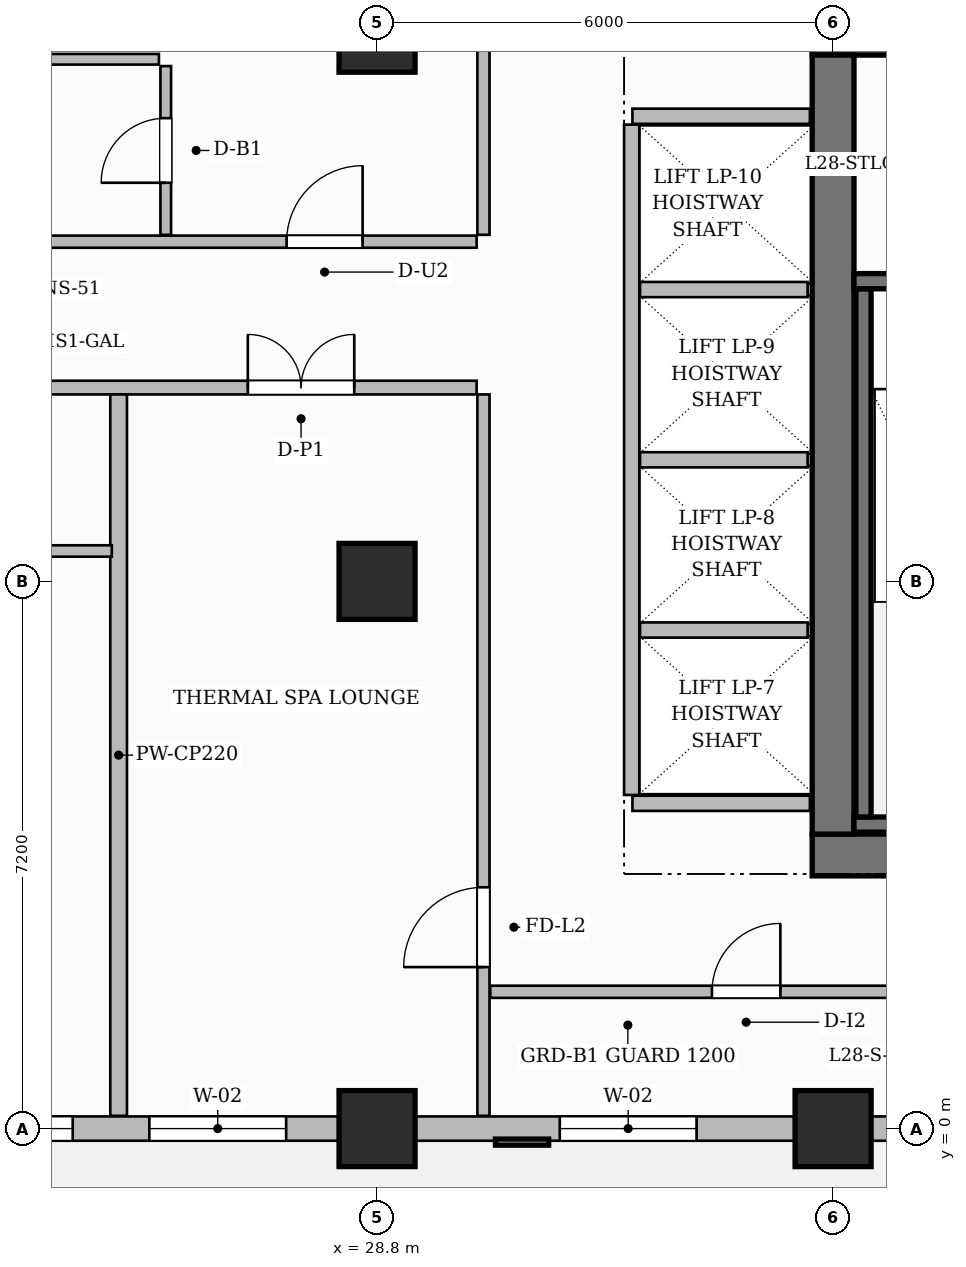
"""IFC4 building model, lengths in metres.
Left out: names, types, materials, properties, quantities, classifications, styles, units other than length and angle.
Written with IfcOpenShell. Run it as: python <this file> out.ifc"""

import sys

from ifc_helpers import new_model, si_unit, direction, frame, frame_2d, origin, origin_2d, place, context, subcontext, project, spatial, rectangle, extrude, source, transform, mapped, element, fill, save


model = new_model("IFC4")
c1 = context("Model", 3, precision=1e-05, world=origin(), true_north=direction((0.0, 1.0)))
c2 = subcontext(c1, "Body", "Model", "MODEL_VIEW")
j1 = project(units=[si_unit("LENGTHUNIT", "METRE"), si_unit("PLANEANGLEUNIT", "RADIAN")], contexts=[c1])
p1 = place(None, origin())
s1 = spatial("IfcSite", under=j1, at=p1, CompositionType="ELEMENT")
p2 = place(p1, origin())
s2 = spatial("IfcBuilding", under=s1, at=p2, CompositionType="ELEMENT")
p3 = place(p2, frame((0.0, 0.0, 115.5)))
s3 = spatial("IfcBuildingStorey", under=s2, at=p3, CompositionType="ELEMENT", Elevation=115.5)
p4 = place(p3, frame((34.525, 3.6, 0.0), z_axis=(0.0, 0.0, 1.0), x_axis=(1.0, 0.0, 0.0)))
e1 = element("IfcWall", 1, at=p4, inside=s3, PredefinedType="SHEAR", context=c2, shape_type="SweptSolid", body=[
    extrude(rectangle(XDim=15.55, YDim=0.55, at=frame_2d((7.775, 0.0))), origin(), (0.0, 0.0, 1.0), 3.7),
])
p5 = place(p4, frame((4.745, 0.0, 0.0)))
e2 = element("IfcOpeningElement", 2, at=p5, cuts=e1, PredefinedType="OPENING", context=c2, shape_type="SweptSolid", body=[
    extrude(rectangle(XDim=0.9, YDim=2.1, at=frame_2d((0.45, 1.05))), frame((0.0, 0.285, 0.0), z_axis=(0.0, -1.0, 0.0), x_axis=(1.0, 0.0, 0.0)), (0.0, 0.0, 1.0), 0.57),
])
p6 = place(p4, frame((7.125, 0.0, 0.0)))
e3 = element("IfcOpeningElement", 3, at=p6, cuts=e1, PredefinedType="OPENING", context=c2, shape_type="SweptSolid", body=[
    extrude(rectangle(XDim=0.9, YDim=2.1, at=frame_2d((0.45, 1.05))), frame((0.0, 0.285, 0.0), z_axis=(0.0, -1.0, 0.0), x_axis=(1.0, 0.0, 0.0)), (0.0, 0.0, 1.0), 0.57),
])
p7 = place(p3, frame((34.525, 14.4, 0.0), z_axis=(0.0, 0.0, 1.0), x_axis=(1.0, 0.0, 0.0)))
e4 = element("IfcWall", 4, at=p7, inside=s3, PredefinedType="SHEAR", context=c2, shape_type="SweptSolid", body=[
    extrude(rectangle(XDim=15.55, YDim=0.55, at=frame_2d((7.775, 0.0))), origin(), (0.0, 0.0, 1.0), 3.7),
])
p8 = place(p7, frame((5.405, 0.0, 0.0)))
e5 = element("IfcOpeningElement", 5, at=p8, cuts=e4, PredefinedType="OPENING", context=c2, shape_type="SweptSolid", body=[
    extrude(rectangle(XDim=1.5, YDim=2.2, at=frame_2d((0.75, 1.1))), frame((0.0, 0.285, 0.0), z_axis=(0.0, -1.0, 0.0), x_axis=(1.0, 0.0, 0.0)), (0.0, 0.0, 1.0), 0.57),
])
p9 = place(p7, frame((1.62, 0.0, 0.0)))
e6 = element("IfcOpeningElement", 6, at=p9, cuts=e4, PredefinedType="OPENING", context=c2, shape_type="SweptSolid", body=[
    extrude(rectangle(XDim=1.05, YDim=2.15, at=frame_2d((0.525, 1.075))), frame((0.0, 0.285, 0.0), z_axis=(0.0, -1.0, 0.0), x_axis=(1.0, 0.0, 0.0)), (0.0, 0.0, 1.0), 0.57),
])
p10 = place(p7, frame((11.25, 0.0, 0.0)))
e7 = element("IfcOpeningElement", 7, at=p10, cuts=e4, PredefinedType="OPENING", context=c2, shape_type="SweptSolid", body=[
    extrude(rectangle(XDim=1.05, YDim=2.15, at=frame_2d((0.525, 1.075))), frame((0.0, 0.285, 0.0), z_axis=(0.0, -1.0, 0.0), x_axis=(1.0, 0.0, 0.0)), (0.0, 0.0, 1.0), 0.57),
])
p11 = place(p3, frame((34.8, 3.875, 0.0), z_axis=(0.0, 0.0, 1.0), x_axis=(0.0, 1.0, 0.0)))
e8 = element("IfcWall", 8, at=p11, inside=s3, PredefinedType="SHEAR", context=c2, shape_type="SweptSolid", body=[
    extrude(rectangle(XDim=10.25, YDim=0.55, at=frame_2d((5.125, 0.0))), origin(), (0.0, 0.0, 1.0), 3.7),
])
m1 = source(origin(), c2, "Body", "SweptSolid", [
    extrude(rectangle(XDim=1.0, YDim=1.0, at=origin_2d()), origin(), (0.0, 0.0, 1.0), 3.7),
])
for number, where, z_axis, x_axis in (
    (9, (28.8, 0.0, 0.0), (0.0, 0.0, 1.0), (1.0, 0.0, 0.0)),
    (10, (28.8, 7.2, 0.0), (0.0, 0.0, 1.0), (1.0, 0.0, 0.0)),
    (11, (28.8, 14.4, 0.0), (0.0, 0.0, 1.0), (1.0, 0.0, 0.0)),
    (12, (34.8, 0.0, 0.0), (0.0, 0.0, 1.0), (1.0, 0.0, 0.0)),
):
    element("IfcColumn", number, at=place(p3, frame(where, z_axis=z_axis, x_axis=x_axis)), inside=s3, PredefinedType="COLUMN", context=c2, shape_type="MappedRepresentation", body=[
        mapped(m1, transform((0.0, 0.0, 0.0), scale=1.0)),
    ])
p12 = place(p3, frame((35.075, 4.0, 0.0), z_axis=(0.0, 0.0, 1.0), x_axis=(1.0, 0.0, 0.0)))
e13 = element("IfcWall", 13, at=p12, inside=s3, PredefinedType="SHEAR", context=c2, shape_type="SweptSolid", body=[
    extrude(rectangle(XDim=3.165, YDim=0.2, at=frame_2d((1.583, 0.0))), origin(), (0.0, 0.0, 1.0), 3.7),
])
p13 = place(p3, frame((35.2, 4.1, 0.0), z_axis=(0.0, 0.0, 1.0), x_axis=(0.0, 1.0, 0.0)))
e14 = element("IfcWall", 14, at=p13, inside=s3, PredefinedType="SHEAR", context=c2, shape_type="SweptSolid", body=[
    extrude(rectangle(XDim=6.95, YDim=0.2, at=frame_2d((3.475, 0.0))), origin(), (0.0, 0.0, 1.0), 3.7),
])
p14 = place(p3, frame((35.075, 11.15, 0.0), z_axis=(0.0, 0.0, 1.0), x_axis=(1.0, 0.0, 0.0)))
e15 = element("IfcWall", 15, at=p14, inside=s3, PredefinedType="SHEAR", context=c2, shape_type="SweptSolid", body=[
    extrude(rectangle(XDim=3.165, YDim=0.2, at=frame_2d((1.583, 0.0))), origin(), (0.0, 0.0, 1.0), 3.7),
])
p15 = place(p14, frame((1.07, 0.0, 0.0)))
e16 = element("IfcOpeningElement", 16, at=p15, cuts=e15, PredefinedType="OPENING", context=c2, shape_type="SweptSolid", body=[
    extrude(rectangle(XDim=1.05, YDim=2.2, at=frame_2d((0.525, 1.1))), frame((0.0, 0.11, 0.0), z_axis=(0.0, -1.0, 0.0), x_axis=(1.0, 0.0, 0.0)), (0.0, 0.0, 1.0), 0.22),
])
for number, where, z_axis, x_axis in (
    (17, (32.16, 4.28, 0.0), (0.0, 0.0, 1.0), (1.0, 0.0, 0.0)),
    (18, (32.16, 13.32, 0.0), (0.0, 0.0, 1.0), (1.0, 0.0, 0.0)),
):
    element("IfcWall", number, at=place(p3, frame(where, z_axis=z_axis, x_axis=x_axis)), inside=s3, PredefinedType="PARTITIONING", context=c2, shape_type="SweptSolid", body=[
        extrude(rectangle(XDim=2.335, YDim=0.2, at=frame_2d((1.167, 0.0))), origin(), (0.0, 0.0, 1.0), 3.45),
    ])
p16 = place(p3, frame((32.15, 4.39, 0.0), z_axis=(0.0, 0.0, 1.0), x_axis=(0.0, 1.0, 0.0)))
e19 = element("IfcWall", 19, at=p16, inside=s3, PredefinedType="PARTITIONING", context=c2, shape_type="SweptSolid", body=[
    extrude(rectangle(XDim=8.82, YDim=0.2, at=frame_2d((4.41, 0.0))), origin(), (0.0, 0.0, 1.0), 3.45),
])
for number, where, z_axis, x_axis in (
    (20, (32.26, 6.56, 0.0), (0.0, 0.0, 1.0), (1.0, 0.0, 0.0)),
    (21, (32.26, 8.8, 0.0), (0.0, 0.0, 1.0), (1.0, 0.0, 0.0)),
    (22, (32.26, 11.04, 0.0), (0.0, 0.0, 1.0), (1.0, 0.0, 0.0)),
):
    element("IfcWall", number, at=place(p3, frame(where, z_axis=z_axis, x_axis=x_axis)), inside=s3, PredefinedType="PARTITIONING", context=c2, shape_type="SweptSolid", body=[
        extrude(rectangle(XDim=2.205, YDim=0.2, at=frame_2d((1.103, 0.0))), origin(), (0.0, 0.0, 1.0), 3.45),
    ])
p17 = place(p3, frame((14.568, 9.75, 0.0), z_axis=(0.0, 0.0, 1.0), x_axis=(1.0, 0.0, 0.0)))
e23 = element("IfcWall", 23, at=p17, inside=s3, PredefinedType="PARTITIONING", context=c2, shape_type="SweptSolid", body=[
    extrude(rectangle(XDim=15.542, YDim=0.18, at=frame_2d((7.771, 0.0))), origin(), (0.0, 0.0, 1.0), 3.45),
])
p18 = place(p17, frame((3.062, 0.0, 0.0)))
e24 = element("IfcOpeningElement", 24, at=p18, cuts=e23, PredefinedType="OPENING", context=c2, shape_type="SweptSolid", body=[
    extrude(rectangle(XDim=1.05, YDim=2.25, at=frame_2d((0.525, 1.125))), frame((0.0, 0.1, 0.0), z_axis=(0.0, -1.0, 0.0), x_axis=(1.0, 0.0, 0.0)), (0.0, 0.0, 1.0), 0.2),
])
p19 = place(p17, frame((12.532, 0.0, 0.0)))
e25 = element("IfcOpeningElement", 25, at=p19, cuts=e23, PredefinedType="OPENING", context=c2, shape_type="SweptSolid", body=[
    extrude(rectangle(XDim=1.4, YDim=2.35, at=frame_2d((0.7, 1.175))), frame((0.0, 0.1, 0.0), z_axis=(0.0, -1.0, 0.0), x_axis=(1.0, 0.0, 0.0)), (0.0, 0.0, 1.0), 0.2),
])
p20 = place(p3, frame((14.568, 11.67, 0.0), z_axis=(0.0, 0.0, 1.0), x_axis=(1.0, 0.0, 0.0)))
e26 = element("IfcWall", 26, at=p20, inside=s3, PredefinedType="PARTITIONING", context=c2, shape_type="SweptSolid", body=[
    extrude(rectangle(XDim=15.542, YDim=0.16, at=frame_2d((7.771, 0.0))), origin(), (0.0, 0.0, 1.0), 3.45),
])
p21 = place(p20, frame((5.217, 0.0, 0.0)))
e27 = element("IfcOpeningElement", 27, at=p21, cuts=e26, PredefinedType="OPENING", context=c2, shape_type="SweptSolid", body=[
    extrude(rectangle(XDim=1.4, YDim=2.35, at=frame_2d((0.7, 1.175))), frame((0.0, 0.09, 0.0), z_axis=(0.0, -1.0, 0.0), x_axis=(1.0, 0.0, 0.0)), (0.0, 0.0, 1.0), 0.18),
])
p22 = place(p20, frame((13.042, 0.0, 0.0)))
e28 = element("IfcOpeningElement", 28, at=p22, cuts=e26, PredefinedType="OPENING", context=c2, shape_type="SweptSolid", body=[
    extrude(rectangle(XDim=1.0, YDim=2.2, at=frame_2d((0.5, 1.1))), frame((0.0, 0.09, 0.0), z_axis=(0.0, -1.0, 0.0), x_axis=(1.0, 0.0, 0.0)), (0.0, 0.0, 1.0), 0.18),
])
p23 = place(p3, frame((30.2, 11.76, 0.0), z_axis=(0.0, 0.0, 1.0), x_axis=(0.0, 1.0, 0.0)))
e29 = element("IfcWall", 29, at=p23, inside=s3, PredefinedType="PARTITIONING", context=c2, shape_type="SweptSolid", body=[
    extrude(rectangle(XDim=5.7, YDim=0.16, at=frame_2d((2.85, 0.0))), origin(), (0.0, 0.0, 1.0), 3.45),
])
p24 = place(p3, frame((30.2, 0.168, 0.0), z_axis=(0.0, 0.0, 1.0), x_axis=(0.0, 1.0, 0.0)))
e30 = element("IfcWall", 30, at=p24, inside=s3, PredefinedType="PARTITIONING", context=c2, shape_type="SweptSolid", body=[
    extrude(rectangle(XDim=9.492, YDim=0.16, at=frame_2d((4.746, 0.0))), origin(), (0.0, 0.0, 1.0), 3.45),
])
p25 = place(p24, frame((1.957, 0.0, 0.0)))
e31 = element("IfcOpeningElement", 31, at=p25, cuts=e30, PredefinedType="OPENING", context=c2, shape_type="SweptSolid", body=[
    extrude(rectangle(XDim=1.05, YDim=2.15, at=frame_2d((0.525, 1.075))), frame((0.0, 0.09, 0.0), z_axis=(0.0, -1.0, 0.0), x_axis=(1.0, 0.0, 0.0)), (0.0, 0.0, 1.0), 0.18),
])
p26 = place(p3, frame((30.29, 1.8, 0.0), z_axis=(0.0, 0.0, 1.0), x_axis=(1.0, 0.0, 0.0)))
e32 = element("IfcWall", 32, at=p26, inside=s3, PredefinedType="PARTITIONING", context=c2, shape_type="SweptSolid", body=[
    extrude(rectangle(XDim=19.37, YDim=0.16, at=frame_2d((9.685, 0.0))), origin(), (0.0, 0.0, 1.0), 3.45),
])
p27 = place(p26, frame((2.916, 0.0, 0.0)))
e33 = element("IfcOpeningElement", 33, at=p27, cuts=e32, PredefinedType="OPENING", context=c2, shape_type="SweptSolid", body=[
    extrude(rectangle(XDim=0.9, YDim=2.15, at=frame_2d((0.45, 1.075))), frame((0.0, 0.09, 0.0), z_axis=(0.0, -1.0, 0.0), x_axis=(1.0, 0.0, 0.0)), (0.0, 0.0, 1.0), 0.18),
])
p28 = place(p26, frame((9.66, 0.0, 0.0)))
e34 = element("IfcOpeningElement", 34, at=p28, cuts=e32, PredefinedType="OPENING", context=c2, shape_type="SweptSolid", body=[
    extrude(rectangle(XDim=0.9, YDim=2.15, at=frame_2d((0.45, 1.075))), frame((0.0, 0.09, 0.0), z_axis=(0.0, -1.0, 0.0), x_axis=(1.0, 0.0, 0.0)), (0.0, 0.0, 1.0), 0.18),
])
p29 = place(p26, frame((15.86, 0.0, 0.0)))
e35 = element("IfcOpeningElement", 35, at=p29, cuts=e32, PredefinedType="OPENING", context=c2, shape_type="SweptSolid", body=[
    extrude(rectangle(XDim=0.9, YDim=2.15, at=frame_2d((0.45, 1.075))), frame((0.0, 0.09, 0.0), z_axis=(0.0, -1.0, 0.0), x_axis=(1.0, 0.0, 0.0)), (0.0, 0.0, 1.0), 0.18),
])
p30 = place(p3, frame((25.4, 0.168, 0.0), z_axis=(0.0, 0.0, 1.0), x_axis=(0.0, 1.0, 0.0)))
e36 = element("IfcWall", 36, at=p30, inside=s3, PredefinedType="PARTITIONING", context=c2, shape_type="SweptSolid", body=[
    extrude(rectangle(XDim=9.492, YDim=0.22, at=frame_2d((4.746, 0.0))), origin(), (0.0, 0.0, 1.0), 3.105),
])
p31 = place(p3, frame((19.57, 7.6, 0.0), z_axis=(0.0, 0.0, 1.0), x_axis=(1.0, 0.0, 0.0)))
e37 = element("IfcWall", 37, at=p31, inside=s3, PredefinedType="PARTITIONING", context=c2, shape_type="SweptSolid", body=[
    extrude(rectangle(XDim=5.74, YDim=0.15, at=frame_2d((2.87, 0.0))), origin(), (0.0, 0.0, 1.0), 3.45),
])
p32 = place(p31, frame((2.762, 0.0, 0.0)))
e38 = element("IfcOpeningElement", 38, at=p32, cuts=e37, PredefinedType="OPENING", context=c2, shape_type="SweptSolid", body=[
    extrude(rectangle(XDim=0.9, YDim=2.15, at=frame_2d((0.45, 1.075))), frame((0.0, 0.085, 0.0), z_axis=(0.0, -1.0, 0.0), x_axis=(1.0, 0.0, 0.0)), (0.0, 0.0, 1.0), 0.17),
])
p33 = place(p3, frame((26.02, 11.76, 0.0), z_axis=(0.0, 0.0, 1.0), x_axis=(0.0, 1.0, 0.0)))
e39 = element("IfcWall", 39, at=p33, inside=s3, PredefinedType="PARTITIONING", context=c2, shape_type="SweptSolid", body=[
    extrude(rectangle(XDim=2.22, YDim=0.14, at=frame_2d((1.11, 0.0))), origin(), (0.0, 0.0, 1.0), 3.45),
])
p34 = place(p33, frame((0.685, 0.0, 0.0)))
e40 = element("IfcOpeningElement", 40, at=p34, cuts=e39, PredefinedType="OPENING", context=c2, shape_type="SweptSolid", body=[
    extrude(rectangle(XDim=0.85, YDim=2.1, at=frame_2d((0.425, 1.05))), frame((0.0, 0.08, 0.0), z_axis=(0.0, -1.0, 0.0), x_axis=(1.0, 0.0, 0.0)), (0.0, 0.0, 1.0), 0.16),
])
p35 = place(p3, frame((23.81, 14.07, 0.0), z_axis=(0.0, 0.0, 1.0), x_axis=(1.0, 0.0, 0.0)))
e41 = element("IfcWall", 41, at=p35, inside=s3, PredefinedType="PARTITIONING", context=c2, shape_type="SweptSolid", body=[
    extrude(rectangle(XDim=2.12, YDim=0.14, at=frame_2d((1.06, 0.0))), origin(), (0.0, 0.0, 1.0), 3.45),
])
p36 = place(p3, frame((14.4, 0.0, 0.0), z_axis=(0.0, 0.0, 1.0), x_axis=(1.0, 0.0, 0.0)))
e42 = element("IfcWall", 42, at=p36, inside=s3, PredefinedType="SOLIDWALL", context=c2, shape_type="SweptSolid", body=[
    extrude(rectangle(XDim=35.4, YDim=0.32, at=frame_2d((17.7, 0.0))), origin(), (0.0, 0.0, 1.0), 2.935),
])
p37 = place(p36, frame((0.85, 0.0, 0.0)))
e43 = element("IfcOpeningElement", 43, at=p37, cuts=e42, PredefinedType="OPENING", context=c2, shape_type="SweptSolid", body=[
    extrude(rectangle(XDim=1.2, YDim=2.2, at=frame_2d((0.6, 1.1))), frame((0.0, 0.17, 0.0), z_axis=(0.0, -1.0, 0.0), x_axis=(1.0, 0.0, 0.0)), (0.0, 0.0, 1.0), 0.34),
])
p38 = place(p36, frame((2.811, 0.0, 0.8)))
e44 = element("IfcOpeningElement", 44, at=p38, cuts=e42, PredefinedType="OPENING", context=c2, shape_type="SweptSolid", body=[
    extrude(rectangle(XDim=1.8, YDim=1.85, at=frame_2d((0.9, 0.925))), frame((0.0, 0.17, 0.0), z_axis=(0.0, -1.0, 0.0), x_axis=(1.0, 0.0, 0.0)), (0.0, 0.0, 1.0), 0.34),
])
p39 = place(p36, frame((5.269, 0.0, 0.8)))
e45 = element("IfcOpeningElement", 45, at=p39, cuts=e42, PredefinedType="OPENING", context=c2, shape_type="SweptSolid", body=[
    extrude(rectangle(XDim=0.95, YDim=1.75, at=frame_2d((0.475, 0.875))), frame((0.0, 0.17, 0.0), z_axis=(0.0, -1.0, 0.0), x_axis=(1.0, 0.0, 0.0)), (0.0, 0.0, 1.0), 0.34),
])
p40 = place(p36, frame((8.596, 0.0, 0.8)))
e46 = element("IfcOpeningElement", 46, at=p40, cuts=e42, PredefinedType="OPENING", context=c2, shape_type="SweptSolid", body=[
    extrude(rectangle(XDim=1.8, YDim=1.85, at=frame_2d((0.9, 0.925))), frame((0.0, 0.17, 0.0), z_axis=(0.0, -1.0, 0.0), x_axis=(1.0, 0.0, 0.0)), (0.0, 0.0, 1.0), 0.34),
])
p41 = place(p36, frame((11.404, 0.0, 0.8)))
e47 = element("IfcOpeningElement", 47, at=p41, cuts=e42, PredefinedType="OPENING", context=c2, shape_type="SweptSolid", body=[
    extrude(rectangle(XDim=1.8, YDim=1.85, at=frame_2d((0.9, 0.925))), frame((0.0, 0.17, 0.0), z_axis=(0.0, -1.0, 0.0), x_axis=(1.0, 0.0, 0.0)), (0.0, 0.0, 1.0), 0.34),
])
p42 = place(p36, frame((16.804, 0.0, 0.8)))
e48 = element("IfcOpeningElement", 48, at=p42, cuts=e42, PredefinedType="OPENING", context=c2, shape_type="SweptSolid", body=[
    extrude(rectangle(XDim=1.8, YDim=1.85, at=frame_2d((0.9, 0.925))), frame((0.0, 0.17, 0.0), z_axis=(0.0, -1.0, 0.0), x_axis=(1.0, 0.0, 0.0)), (0.0, 0.0, 1.0), 0.34),
])
p43 = place(p36, frame((21.521, 0.0, 0.8)))
e49 = element("IfcOpeningElement", 49, at=p43, cuts=e42, PredefinedType="OPENING", context=c2, shape_type="SweptSolid", body=[
    extrude(rectangle(XDim=0.95, YDim=1.75, at=frame_2d((0.475, 0.875))), frame((0.0, 0.17, 0.0), z_axis=(0.0, -1.0, 0.0), x_axis=(1.0, 0.0, 0.0)), (0.0, 0.0, 1.0), 0.34),
])
p44 = place(p36, frame((23.904, 0.0, 0.8)))
e50 = element("IfcOpeningElement", 50, at=p44, cuts=e42, PredefinedType="OPENING", context=c2, shape_type="SweptSolid", body=[
    extrude(rectangle(XDim=1.8, YDim=1.85, at=frame_2d((0.9, 0.925))), frame((0.0, 0.17, 0.0), z_axis=(0.0, -1.0, 0.0), x_axis=(1.0, 0.0, 0.0)), (0.0, 0.0, 1.0), 0.34),
])
p45 = place(p36, frame((29.681, 0.0, 0.8)))
e51 = element("IfcOpeningElement", 51, at=p45, cuts=e42, PredefinedType="OPENING", context=c2, shape_type="SweptSolid", body=[
    extrude(rectangle(XDim=1.8, YDim=1.85, at=frame_2d((0.9, 0.925))), frame((0.0, 0.17, 0.0), z_axis=(0.0, -1.0, 0.0), x_axis=(1.0, 0.0, 0.0)), (0.0, 0.0, 1.0), 0.34),
])
p46 = place(p36, frame((32.327, 0.0, 0.8)))
e52 = element("IfcOpeningElement", 52, at=p46, cuts=e42, PredefinedType="OPENING", context=c2, shape_type="SweptSolid", body=[
    extrude(rectangle(XDim=1.8, YDim=1.85, at=frame_2d((0.9, 0.925))), frame((0.0, 0.17, 0.0), z_axis=(0.0, -1.0, 0.0), x_axis=(1.0, 0.0, 0.0)), (0.0, 0.0, 1.0), 0.34),
])
m2 = source(origin(), c2, "Body", "SweptSolid", [
    extrude(rectangle(XDim=1.05, YDim=2.15, at=frame_2d((0.525, 1.075))), frame((0.0, 0.025, 0.0), z_axis=(0.0, -1.0, 0.0), x_axis=(1.0, 0.0, 0.0)), (0.0, 0.0, 1.0), 0.05),
])
p47 = place(p25, origin())
e53 = element("IfcDoor", 53, at=p47, inside=s3, OperationType="SINGLE_SWING_LEFT", PredefinedType="DOOR", context=c2, shape_type="MappedRepresentation", body=[
    mapped(m2, transform((0.0, 0.0, 0.0), scale=1.0)),
])
fill(e31, e53)
m3 = source(origin(), c2, "Body", "SweptSolid", [
    extrude(rectangle(XDim=0.9, YDim=2.15, at=frame_2d((0.45, 1.075))), frame((0.0, 0.025, 0.0), z_axis=(0.0, -1.0, 0.0), x_axis=(1.0, 0.0, 0.0)), (0.0, 0.0, 1.0), 0.05),
])
p48 = place(p27, origin())
e54 = element("IfcDoor", 54, at=p48, inside=s3, OperationType="SINGLE_SWING_RIGHT", PredefinedType="DOOR", context=c2, shape_type="MappedRepresentation", body=[
    mapped(m3, transform((0.0, 0.0, 0.0), scale=1.0)),
])
fill(e33, e54)
m4 = source(origin(), c2, "Body", "SweptSolid", [
    extrude(rectangle(XDim=1.4, YDim=2.35, at=frame_2d((0.7, 1.175))), frame((0.0, 0.025, 0.0), z_axis=(0.0, -1.0, 0.0), x_axis=(1.0, 0.0, 0.0)), (0.0, 0.0, 1.0), 0.05),
])
p49 = place(p19, origin())
e55 = element("IfcDoor", 55, at=p49, inside=s3, OperationType="DOUBLE_DOOR_SINGLE_SWING", PredefinedType="DOOR", context=c2, shape_type="MappedRepresentation", body=[
    mapped(m4, transform((0.0, 0.0, 0.0), scale=1.0)),
])
fill(e25, e55)
m5 = source(origin(), c2, "Body", "SweptSolid", [
    extrude(rectangle(XDim=0.85, YDim=2.1, at=frame_2d((0.425, 1.05))), frame((0.0, 0.025, 0.0), z_axis=(0.0, -1.0, 0.0), x_axis=(1.0, 0.0, 0.0)), (0.0, 0.0, 1.0), 0.05),
])
p50 = place(p34, origin())
e56 = element("IfcDoor", 56, at=p50, inside=s3, OperationType="SINGLE_SWING_LEFT", PredefinedType="DOOR", context=c2, shape_type="MappedRepresentation", body=[
    mapped(m5, transform((0.0, 0.0, 0.0), scale=1.0)),
])
fill(e40, e56)
m6 = source(origin(), c2, "Body", "SweptSolid", [
    extrude(rectangle(XDim=1.0, YDim=2.2, at=frame_2d((0.5, 1.1))), frame((0.0, 0.025, 0.0), z_axis=(0.0, -1.0, 0.0), x_axis=(1.0, 0.0, 0.0)), (0.0, 0.0, 1.0), 0.05),
])
p51 = place(p22, origin())
e57 = element("IfcDoor", 57, at=p51, inside=s3, OperationType="SINGLE_SWING_RIGHT", PredefinedType="DOOR", context=c2, shape_type="MappedRepresentation", body=[
    mapped(m6, transform((0.0, 0.0, 0.0), scale=1.0)),
])
fill(e28, e57)
m7 = source(origin(), c2, "Body", "SweptSolid", [
    extrude(rectangle(XDim=1.8, YDim=1.85, at=frame_2d((0.9, 0.925))), frame((0.0, 0.03, 0.0), z_axis=(0.0, -1.0, 0.0), x_axis=(1.0, 0.0, 0.0)), (0.0, 0.0, 1.0), 0.06),
])
p52 = place(p40, origin())
e58 = element("IfcWindow", 58, at=p52, inside=s3, PartitioningType="DOUBLE_PANEL_VERTICAL", PredefinedType="WINDOW", context=c2, shape_type="MappedRepresentation", body=[
    mapped(m7, transform((0.0, 0.0, 0.0), scale=1.0)),
])
fill(e46, e58)
p53 = place(p41, origin())
e59 = element("IfcWindow", 59, at=p53, inside=s3, PartitioningType="DOUBLE_PANEL_VERTICAL", PredefinedType="WINDOW", context=c2, shape_type="MappedRepresentation", body=[
    mapped(m7, transform((0.0, 0.0, 0.0), scale=1.0)),
])
fill(e47, e59)
p54 = place(p42, origin())
e60 = element("IfcWindow", 60, at=p54, inside=s3, PartitioningType="DOUBLE_PANEL_VERTICAL", PredefinedType="WINDOW", context=c2, shape_type="MappedRepresentation", body=[
    mapped(m7, transform((0.0, 0.0, 0.0), scale=1.0)),
])
fill(e48, e60)
save(model, sys.argv[1])
